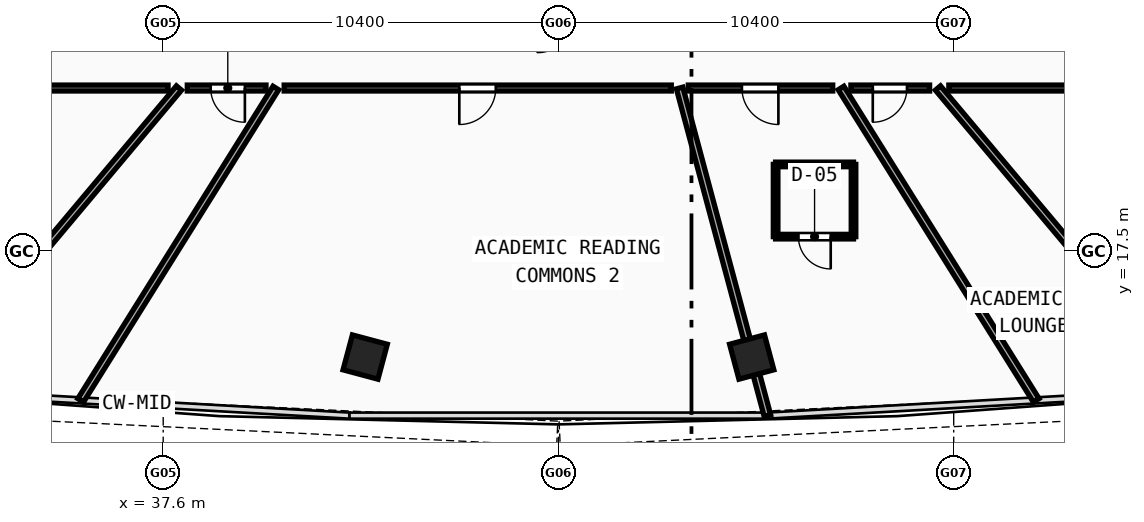
"""IFC4 building model, lengths in metres.
Left out: names, types, materials, properties, quantities, classifications, styles, units other than length and angle.
Written with IfcOpenShell. Run it as: python <this file> out.ifc"""

import sys

from ifc_helpers import new_model, si_unit, direction, frame, frame_2d, origin, origin_with_axes, origin_2d, place, context, subcontext, project, spatial, rectangle, hollow_rectangle, extrude, source, transform, mapped, element, fill, save


model = new_model("IFC4")
c1 = context("Model", 3, precision=1e-05, world=origin(), true_north=direction((0.0, 1.0)))
c2 = subcontext(c1, "Body", "Model", "MODEL_VIEW")
j1 = project(units=[si_unit("LENGTHUNIT", "METRE"), si_unit("PLANEANGLEUNIT", "RADIAN")], contexts=[c1])
p1 = place(None, origin())
s1 = spatial("IfcSite", under=j1, at=p1, CompositionType="ELEMENT")
p2 = place(p1, origin())
s2 = spatial("IfcBuilding", under=s1, at=p2, CompositionType="ELEMENT")
p3 = place(p2, frame((0.0, 0.0, 140.87)))
s3 = spatial("IfcBuildingStorey", under=s2, at=p3, CompositionType="ELEMENT", Elevation=140.87)
m1 = source(origin(), c2, "Body", "SweptSolid", [
    extrude(hollow_rectangle(XDim=0.95, YDim=0.95, WallThickness=0.04, at=origin_2d()), origin(), (0.0, 0.0, 1.0), 3.68),
])
for number, where, z_axis, x_axis in (
    (1, (42.915, 14.722, -0.26), (0.0, 0.0, 1.0), (0.966, -0.259, 0.0)),
    (2, (53.085, 14.722, -0.26), (0.0, 0.0, 1.0), (0.966, 0.259, 0.0)),
):
    element("IfcColumn", number, at=place(p3, frame(where, z_axis=z_axis, x_axis=x_axis)), inside=s3, PredefinedType="COLUMN", context=c2, shape_type="MappedRepresentation", body=[
        mapped(m1, transform((0.0, 0.0, 0.0), scale=1.0)),
    ])
p4 = place(p3, frame((38.015, 21.8, 0.0), z_axis=(0.0, 0.0, 1.0), x_axis=(-0.642781677101, -0.76604942111, 0.0)))
e3 = element("IfcWall", 3, at=p4, inside=s3, PredefinedType="PARTITIONING", context=c2, shape_type="SweptSolid", body=[
    extrude(rectangle(XDim=10.424, YDim=0.175, at=frame_2d((5.212, 0.0))), origin(), (0.0, 0.0, 1.0), 2.77),
])
p5 = place(p3, frame((40.564, 21.8, 0.0), z_axis=(0.0, 0.0, 1.0), x_axis=(-0.529931002604, -0.848040761096, 0.0)))
e4 = element("IfcWall", 4, at=p5, inside=s3, PredefinedType="PARTITIONING", context=c2, shape_type="SweptSolid", body=[
    extrude(rectangle(XDim=9.691, YDim=0.175, at=frame_2d((4.845, 0.0))), origin(), (0.0, 0.0, 1.0), 2.77),
])
p6 = place(p3, frame((51.189, 21.8, 0.0), z_axis=(0.0, 0.0, 1.0), x_axis=(0.258794890482, -0.965932298177, 0.0)))
e5 = element("IfcWall", 5, at=p6, inside=s3, PredefinedType="PARTITIONING", context=c2, shape_type="SweptSolid", body=[
    extrude(rectangle(XDim=8.923, YDim=0.175, at=frame_2d((4.462, 0.0))), origin(), (0.0, 0.0, 1.0), 2.77),
])
p7 = place(p3, frame((55.436, 21.8, 0.0), z_axis=(0.0, 0.0, 1.0), x_axis=(0.529931002604, -0.848040761096, 0.0)))
e6 = element("IfcWall", 6, at=p7, inside=s3, PredefinedType="PARTITIONING", context=c2, shape_type="SweptSolid", body=[
    extrude(rectangle(XDim=9.691, YDim=0.175, at=frame_2d((4.845, 0.0))), origin(), (0.0, 0.0, 1.0), 2.77),
])
p8 = place(p3, frame((57.985, 21.8, 0.0), z_axis=(0.0, 0.0, 1.0), x_axis=(0.642781677101, -0.76604942111, 0.0)))
e7 = element("IfcWall", 7, at=p8, inside=s3, PredefinedType="PARTITIONING", context=c2, shape_type="SweptSolid", body=[
    extrude(rectangle(XDim=10.424, YDim=0.175, at=frame_2d((5.212, 0.0))), origin(), (0.0, 0.0, 1.0), 2.77),
])
p9 = place(p3, frame((66.4, 21.8, 0.0), z_axis=(0.0, 0.0, 1.0), x_axis=(-1.0, 0.0, 0.0)))
e8 = element("IfcWall", 8, at=p9, inside=s3, PredefinedType="PARTITIONING", context=c2, shape_type="SweptSolid", body=[
    extrude(rectangle(XDim=8.127, YDim=0.155, at=frame_2d((4.064, 0.0))), origin(), (0.0, 0.0, 1.0), 3.02),
])
p10 = place(p3, frame((57.765, 21.8, 0.0), z_axis=(0.0, 0.0, 1.0), x_axis=(-1.0, 0.0, 0.0)))
e9 = element("IfcWall", 9, at=p10, inside=s3, PredefinedType="PARTITIONING", context=c2, shape_type="SweptSolid", body=[
    extrude(rectangle(XDim=2.07, YDim=0.155, at=frame_2d((1.035, 0.0))), origin(), (0.0, 0.0, 1.0), 2.77),
])
p11 = place(p10, frame((0.595, 0.0, 0.0)))
e10 = element("IfcOpeningElement", 10, at=p11, cuts=e9, PredefinedType="OPENING", context=c2, shape_type="SweptSolid", body=[
    extrude(rectangle(XDim=0.9, YDim=2.08, at=frame_2d((0.45, 1.04))), frame((0.0, 0.087, 0.0), z_axis=(0.0, -1.0, 0.0), x_axis=(1.0, 0.0, 0.0)), (0.0, 0.0, 1.0), 0.175),
])
p12 = place(p3, frame((55.216, 21.8, 0.0), z_axis=(0.0, 0.0, 1.0), x_axis=(-1.0, 0.0, 0.0)))
e11 = element("IfcWall", 11, at=p12, inside=s3, PredefinedType="PARTITIONING", context=c2, shape_type="SweptSolid", body=[
    extrude(rectangle(XDim=3.8, YDim=0.155, at=frame_2d((1.9, 0.0))), origin(), (0.0, 0.0, 1.0), 3.42),
])
p13 = place(p12, frame((1.429, 0.0, 0.0)))
e12 = element("IfcOpeningElement", 12, at=p13, cuts=e11, PredefinedType="OPENING", context=c2, shape_type="SweptSolid", body=[
    extrude(rectangle(XDim=0.96, YDim=2.12, at=frame_2d((0.48, 1.06))), frame((0.0, 0.087, 0.0), z_axis=(0.0, -1.0, 0.0), x_axis=(1.0, 0.0, 0.0)), (0.0, 0.0, 1.0), 0.175),
])
p14 = place(p3, frame((50.969, 21.8, 0.0), z_axis=(0.0, 0.0, 1.0), x_axis=(-1.0, 0.0, 0.0)))
e13 = element("IfcWall", 13, at=p14, inside=s3, PredefinedType="PARTITIONING", context=c2, shape_type="SweptSolid", body=[
    extrude(rectangle(XDim=10.185, YDim=0.155, at=frame_2d((5.092, 0.0))), origin(), (0.0, 0.0, 1.0), 2.77),
])
p15 = place(p14, frame((4.617, 0.0, 0.0)))
e14 = element("IfcOpeningElement", 14, at=p15, cuts=e13, PredefinedType="OPENING", context=c2, shape_type="SweptSolid", body=[
    extrude(rectangle(XDim=0.96, YDim=2.12, at=frame_2d((0.48, 1.06))), frame((0.0, 0.087, 0.0), z_axis=(0.0, -1.0, 0.0), x_axis=(1.0, 0.0, 0.0)), (0.0, 0.0, 1.0), 0.175),
])
p16 = place(p3, frame((40.305, 21.8, 0.0), z_axis=(0.0, 0.0, 1.0), x_axis=(-1.0, 0.0, 0.0)))
e15 = element("IfcWall", 15, at=p16, inside=s3, PredefinedType="PARTITIONING", context=c2, shape_type="SweptSolid", body=[
    extrude(rectangle(XDim=2.07, YDim=0.155, at=frame_2d((1.035, 0.0))), origin(), (0.0, 0.0, 1.0), 2.77),
])
p17 = place(p16, frame((0.555, 0.0, 0.0)))
e16 = element("IfcOpeningElement", 16, at=p17, cuts=e15, PredefinedType="OPENING", context=c2, shape_type="SweptSolid", body=[
    extrude(rectangle(XDim=0.9, YDim=2.08, at=frame_2d((0.45, 1.04))), frame((0.0, 0.087, 0.0), z_axis=(0.0, -1.0, 0.0), x_axis=(1.0, 0.0, 0.0)), (0.0, 0.0, 1.0), 0.175),
])
p18 = place(p3, frame((37.728, 21.8, 0.0), z_axis=(0.0, 0.0, 1.0), x_axis=(-1.0, 0.0, 0.0)))
e17 = element("IfcWall", 17, at=p18, inside=s3, PredefinedType="PARTITIONING", context=c2, shape_type="SweptSolid", body=[
    extrude(rectangle(XDim=8.127, YDim=0.155, at=frame_2d((4.064, 0.0))), origin(), (0.0, 0.0, 1.0), 3.02),
])
p19 = place(p3, frame((53.714, 17.89, 0.0), z_axis=(0.0, 0.0, 1.0), x_axis=(1.0, 0.0, 0.0)))
e18 = element("IfcWall", 18, at=p19, inside=s3, PredefinedType="PARTITIONING", context=c2, shape_type="SweptSolid", body=[
    extrude(rectangle(XDim=2.05, YDim=0.12, at=frame_2d((1.025, 0.0))), origin(), (0.0, 0.0, 1.0), 3.42),
])
p20 = place(p19, frame((0.6, 0.0, 0.0)))
e19 = element("IfcOpeningElement", 19, at=p20, cuts=e18, PredefinedType="OPENING", context=c2, shape_type="SweptSolid", body=[
    extrude(rectangle(XDim=0.85, YDim=2.1, at=frame_2d((0.425, 1.05))), frame((0.0, 0.07, 0.0), z_axis=(0.0, -1.0, 0.0), x_axis=(1.0, 0.0, 0.0)), (0.0, 0.0, 1.0), 0.14),
])
p21 = place(p3, frame((55.764, 17.89, 0.0), z_axis=(0.0, 0.0, 1.0), x_axis=(0.0, 1.0, 0.0)))
e20 = element("IfcWall", 20, at=p21, inside=s3, PredefinedType="PARTITIONING", context=c2, shape_type="SweptSolid", body=[
    extrude(rectangle(XDim=1.9, YDim=0.12, at=frame_2d((0.95, 0.0))), origin(), (0.0, 0.0, 1.0), 3.02),
])
p22 = place(p3, frame((55.764, 19.79, 0.0), z_axis=(0.0, 0.0, 1.0), x_axis=(-1.0, 0.0, 0.0)))
e21 = element("IfcWall", 21, at=p22, inside=s3, PredefinedType="PARTITIONING", context=c2, shape_type="SweptSolid", body=[
    extrude(rectangle(XDim=2.05, YDim=0.12, at=frame_2d((1.025, 0.0))), origin(), (0.0, 0.0, 1.0), 3.42),
])
p23 = place(p3, frame((53.714, 19.79, 0.0), z_axis=(0.0, 0.0, 1.0), x_axis=(0.0, -1.0, 0.0)))
e22 = element("IfcWall", 22, at=p23, inside=s3, PredefinedType="PARTITIONING", context=c2, shape_type="SweptSolid", body=[
    extrude(rectangle(XDim=1.9, YDim=0.12, at=frame_2d((0.95, 0.0))), origin(), (0.0, 0.0, 1.0), 3.02),
])
m2 = source(origin(), c2, "Body", "SweptSolid", [
    extrude(rectangle(XDim=0.9, YDim=2.08, at=frame_2d((0.45, 1.04))), frame((0.0, 0.025, 0.0), z_axis=(0.0, -1.0, 0.0), x_axis=(1.0, 0.0, 0.0)), (0.0, 0.0, 1.0), 0.05),
])
p24 = place(p17, origin_with_axes())
e23 = element("IfcDoor", 23, at=p24, inside=s3, OperationType="SINGLE_SWING_LEFT", PredefinedType="DOOR", context=c2, shape_type="MappedRepresentation", body=[
    mapped(m2, transform((0.0, 0.0, 0.0), scale=1.0)),
])
fill(e16, e23)
m3 = source(origin(), c2, "Body", "SweptSolid", [
    extrude(rectangle(XDim=0.96, YDim=2.12, at=frame_2d((0.48, 1.06))), frame((0.0, 0.025, 0.0), z_axis=(0.0, -1.0, 0.0), x_axis=(1.0, 0.0, 0.0)), (0.0, 0.0, 1.0), 0.05),
])
p25 = place(p15, origin_with_axes())
e24 = element("IfcDoor", 24, at=p25, inside=s3, OperationType="SINGLE_SWING_RIGHT", PredefinedType="DOOR", context=c2, shape_type="MappedRepresentation", body=[
    mapped(m3, transform((0.0, 0.0, 0.0), scale=1.0)),
])
fill(e14, e24)
p26 = place(p13, origin_with_axes())
e25 = element("IfcDoor", 25, at=p26, inside=s3, OperationType="SINGLE_SWING_LEFT", PredefinedType="DOOR", context=c2, shape_type="MappedRepresentation", body=[
    mapped(m3, transform((0.0, 0.0, 0.0), scale=1.0)),
])
fill(e12, e25)
m4 = source(origin(), c2, "Body", "SweptSolid", [
    extrude(rectangle(XDim=0.85, YDim=2.1, at=frame_2d((0.425, 1.05))), frame((0.0, 0.025, 0.0), z_axis=(0.0, -1.0, 0.0), x_axis=(1.0, 0.0, 0.0)), (0.0, 0.0, 1.0), 0.05),
])
p27 = place(p20, frame((0.85, 0.0, 0.0), z_axis=(0.0, 0.0, 1.0), x_axis=(-1.0, 0.0, 0.0)))
e26 = element("IfcDoor", 26, at=p27, inside=s3, OperationType="SINGLE_SWING_LEFT", PredefinedType="DOOR", context=c2, shape_type="MappedRepresentation", body=[
    mapped(m4, transform((0.0, 0.0, 0.0), scale=1.0)),
])
fill(e19, e26)
p28 = place(p11, origin_with_axes())
e27 = element("IfcDoor", 27, at=p28, inside=s3, OperationType="SINGLE_SWING_RIGHT", PredefinedType="DOOR", context=c2, shape_type="MappedRepresentation", body=[
    mapped(m2, transform((0.0, 0.0, 0.0), scale=1.0)),
])
fill(e10, e27)
save(model, sys.argv[1])
